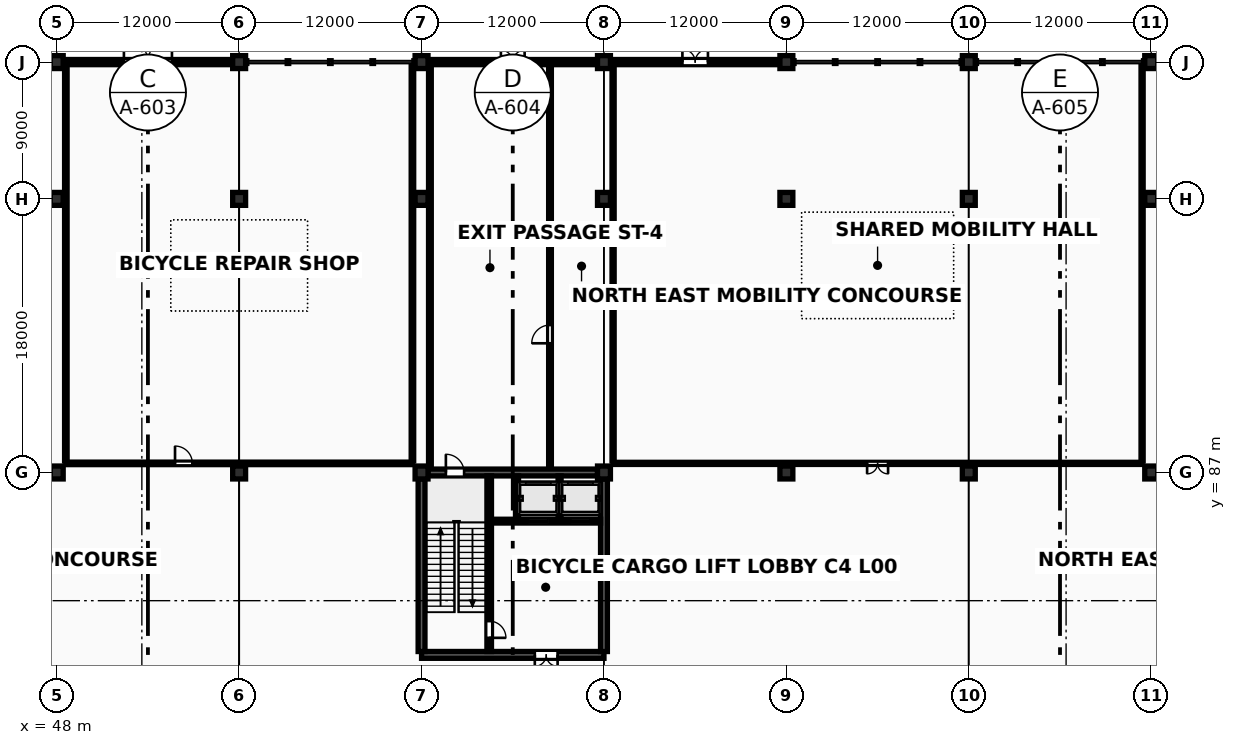
"""IFC4 building model, lengths in metres.
Left out: names, types, materials, properties, quantities, classifications, styles, units other than length and angle.
Written with IfcOpenShell. Run it as: python <this file> out.ifc"""

import sys

from ifc_helpers import new_model, si_unit, direction, frame, frame_2d, origin, origin_2d, place, context, subcontext, project, spatial, rectangle, extrude, element, fill, save


model = new_model("IFC4")
c1 = context("Model", 3, precision=1e-05, world=origin(), true_north=direction((0.0, 1.0)))
c2 = subcontext(c1, "Body", "Model", "MODEL_VIEW")
j1 = project(units=[si_unit("LENGTHUNIT", "METRE"), si_unit("PLANEANGLEUNIT", "RADIAN")], contexts=[c1])
p1 = place(None, origin())
s1 = spatial("IfcSite", under=j1, at=p1, CompositionType="ELEMENT")
p2 = place(p1, origin())
s2 = spatial("IfcBuilding", under=s1, at=p2, CompositionType="ELEMENT")
p3 = place(p2, origin())
s3 = spatial("IfcBuildingStorey", under=s2, at=p3, CompositionType="ELEMENT", Elevation=0.0)
for number, where, z_axis, x_axis in (
    (1, (48.0, 87.0, 0.0), (0.0, 0.0, 1.0), (1.0, 0.0, 0.0)),
    (2, (48.0, 105.0, 0.0), (0.0, 0.0, 1.0), (1.0, 0.0, 0.0)),
    (3, (48.0, 114.0, 0.0), (0.0, 0.0, 1.0), (1.0, 0.0, 0.0)),
    (4, (60.0, 87.0, 0.0), (0.0, 0.0, 1.0), (1.0, 0.0, 0.0)),
    (5, (60.0, 105.0, 0.0), (0.0, 0.0, 1.0), (1.0, 0.0, 0.0)),
    (6, (60.0, 114.0, 0.0), (0.0, 0.0, 1.0), (1.0, 0.0, 0.0)),
    (7, (72.0, 87.0, 0.0), (0.0, 0.0, 1.0), (1.0, 0.0, 0.0)),
    (8, (72.0, 105.0, 0.0), (0.0, 0.0, 1.0), (1.0, 0.0, 0.0)),
    (9, (72.0, 114.0, 0.0), (0.0, 0.0, 1.0), (1.0, 0.0, 0.0)),
    (10, (84.0, 87.0, 0.0), (0.0, 0.0, 1.0), (1.0, 0.0, 0.0)),
    (11, (84.0, 105.0, 0.0), (0.0, 0.0, 1.0), (1.0, 0.0, 0.0)),
    (12, (84.0, 114.0, 0.0), (0.0, 0.0, 1.0), (1.0, 0.0, 0.0)),
    (13, (96.0, 87.0, 0.0), (0.0, 0.0, 1.0), (1.0, 0.0, 0.0)),
    (14, (96.0, 105.0, 0.0), (0.0, 0.0, 1.0), (1.0, 0.0, 0.0)),
    (15, (96.0, 114.0, 0.0), (0.0, 0.0, 1.0), (1.0, 0.0, 0.0)),
    (16, (108.0, 87.0, 0.0), (0.0, 0.0, 1.0), (1.0, 0.0, 0.0)),
    (17, (108.0, 105.0, 0.0), (0.0, 0.0, 1.0), (1.0, 0.0, 0.0)),
    (18, (108.0, 114.0, 0.0), (0.0, 0.0, 1.0), (1.0, 0.0, 0.0)),
    (19, (120.0, 87.0, 0.0), (0.0, 0.0, 1.0), (1.0, 0.0, 0.0)),
    (20, (120.0, 105.0, 0.0), (0.0, 0.0, 1.0), (1.0, 0.0, 0.0)),
    (21, (120.0, 114.0, 0.0), (0.0, 0.0, 1.0), (1.0, 0.0, 0.0)),
):
    element("IfcColumn", number, at=place(p3, frame(where, z_axis=z_axis, x_axis=x_axis)), inside=s3, PredefinedType="COLUMN", context=c2, shape_type="SweptSolid", body=[
        extrude(rectangle(XDim=0.85, YDim=0.85, at=origin_2d()), origin(), (0.0, 0.0, 1.0), 5.4),
    ])
p4 = place(p3, frame((72.0, 75.0, 0.0), z_axis=(0.0, 0.0, 1.0), x_axis=(1.0, 0.0, 0.0)))
e22 = element("IfcWall", 22, at=p4, inside=s3, PredefinedType="SHEAR", context=c2, shape_type="SweptSolid", body=[
    extrude(rectangle(XDim=12.0, YDim=0.45, at=frame_2d((6.0, 0.0))), origin(), (0.0, 0.0, 1.0), 5.203),
])
p5 = place(p4, frame((7.45, 0.0, 0.0)))
e23 = element("IfcOpeningElement", 23, at=p5, cuts=e22, PredefinedType="OPENING", context=c2, shape_type="SweptSolid", body=[
    extrude(rectangle(XDim=1.5, YDim=2.25, at=frame_2d((0.75, 1.125))), frame((0.0, 0.24, 0.0), z_axis=(0.0, -1.0, 0.0), x_axis=(1.0, 0.0, 0.0)), (0.0, 0.0, 1.0), 0.48),
])
p6 = place(p3, frame((72.422, 87.0, 0.0), z_axis=(0.0, 0.0, 1.0), x_axis=(1.0, 0.0, 0.0)))
e24 = element("IfcWall", 24, at=p6, inside=s3, PredefinedType="SHEAR", context=c2, shape_type="SweptSolid", body=[
    extrude(rectangle(XDim=11.156, YDim=0.45, at=frame_2d((5.578, 0.0))), origin(), (0.0, 0.0, 1.0), 5.203),
])
p7 = place(p6, frame((1.178, 0.0, 0.0)))
e25 = element("IfcOpeningElement", 25, at=p7, cuts=e24, PredefinedType="OPENING", context=c2, shape_type="SweptSolid", body=[
    extrude(rectangle(XDim=1.2, YDim=2.2, at=frame_2d((0.6, 1.1))), frame((0.0, 0.24, 0.0), z_axis=(0.0, -1.0, 0.0), x_axis=(1.0, 0.0, 0.0)), (0.0, 0.0, 1.0), 0.48),
])
for number, where, z_axis, x_axis in (
    (26, (72.0, 75.222, 0.0), (0.0, 0.0, 1.0), (0.0, 1.0, 0.0)),
    (27, (84.0, 75.222, 0.0), (0.0, 0.0, 1.0), (0.0, 1.0, 0.0)),
):
    element("IfcWall", number, at=place(p3, frame(where, z_axis=z_axis, x_axis=x_axis)), inside=s3, PredefinedType="SHEAR", context=c2, shape_type="SweptSolid", body=[
        extrude(rectangle(XDim=11.356, YDim=0.45, at=frame_2d((5.678, 0.0))), origin(), (0.0, 0.0, 1.0), 5.203),
    ])
p8 = place(p3, frame((76.45, 75.222, 0.0), z_axis=(0.0, 0.0, 1.0), x_axis=(0.0, 1.0, 0.0)))
e28 = element("IfcWall", 28, at=p8, inside=s3, PredefinedType="SHEAR", context=c2, shape_type="SweptSolid", body=[
    extrude(rectangle(XDim=11.556, YDim=0.3, at=frame_2d((5.778, 0.0))), origin(), (0.0, 0.0, 1.0), 5.203),
])
p9 = place(p8, frame((0.9, 0.0, 0.0)))
e29 = element("IfcOpeningElement", 29, at=p9, cuts=e28, PredefinedType="OPENING", context=c2, shape_type="SweptSolid", body=[
    extrude(rectangle(XDim=1.1, YDim=2.2, at=frame_2d((0.55, 1.1))), frame((0.0, 0.165, 0.0), z_axis=(0.0, -1.0, 0.0), x_axis=(1.0, 0.0, 0.0)), (0.0, 0.0, 1.0), 0.33),
])
p10 = place(p3, frame((76.597, 83.8, 0.0), z_axis=(0.0, 0.0, 1.0), x_axis=(1.0, 0.0, 0.0)))
e30 = element("IfcWall", 30, at=p10, inside=s3, PredefinedType="SOLIDWALL", context=c2, shape_type="SweptSolid", body=[
    extrude(rectangle(XDim=7.181, YDim=0.25, at=frame_2d((3.591, 0.0))), origin(), (0.0, 0.0, 1.0), 5.203),
])
p11 = place(p10, frame((2.433, 0.0, 0.0)))
e31 = element("IfcOpeningElement", 31, at=p11, cuts=e30, PredefinedType="OPENING", context=c2, shape_type="SweptSolid", body=[
    extrude(rectangle(XDim=1.3, YDim=2.28, at=frame_2d((0.65, 1.14))), frame((0.0, 0.14, 0.0), z_axis=(0.0, -1.0, 0.0), x_axis=(1.0, 0.0, 0.0)), (0.0, 0.0, 1.0), 0.28),
])
p12 = place(p10, frame((5.203, 0.0, 0.0)))
e32 = element("IfcOpeningElement", 32, at=p12, cuts=e30, PredefinedType="OPENING", context=c2, shape_type="SweptSolid", body=[
    extrude(rectangle(XDim=1.3, YDim=2.28, at=frame_2d((0.65, 1.14))), frame((0.0, 0.14, 0.0), z_axis=(0.0, -1.0, 0.0), x_axis=(1.0, 0.0, 0.0)), (0.0, 0.0, 1.0), 0.28),
])
for number, where, z_axis, x_axis in (
    (33, (78.28, 83.92, 0.0), (0.0, 0.0, 1.0), (0.0, 1.0, 0.0)),
    (34, (81.08, 83.92, 0.0), (0.0, 0.0, 1.0), (0.0, 1.0, 0.0)),
):
    element("IfcWall", number, at=place(p3, frame(where, z_axis=z_axis, x_axis=x_axis)), inside=s3, PredefinedType="SOLIDWALL", context=c2, shape_type="SweptSolid", body=[
        extrude(rectangle(XDim=2.855, YDim=0.2, at=frame_2d((1.427, 0.0))), origin(), (0.0, 0.0, 1.0), 5.193),
    ])
p13 = place(p3, frame((48.423, 114.0, 0.0), z_axis=(0.0, 0.0, 1.0), x_axis=(1.0, 0.0, 0.0)))
e35 = element("IfcWall", 35, at=p13, inside=s3, PredefinedType="SOLIDWALL", context=c2, shape_type="SweptSolid", body=[
    extrude(rectangle(XDim=11.154, YDim=0.34, at=frame_2d((5.577, 0.0))), origin(), (0.0, 0.0, 1.0), 3.85),
])
p14 = place(p13, frame((3.997, 0.0, 0.0)))
e36 = element("IfcOpeningElement", 36, at=p14, cuts=e35, PredefinedType="OPENING", context=c2, shape_type="SweptSolid", body=[
    extrude(rectangle(XDim=3.16, YDim=2.66, at=frame_2d((1.58, 1.33))), frame((0.0, 0.185, 0.0), z_axis=(0.0, -1.0, 0.0), x_axis=(1.0, 0.0, 0.0)), (0.0, 0.0, 1.0), 0.37),
])
p15 = place(p3, frame((72.423, 114.0, 0.0), z_axis=(0.0, 0.0, 1.0), x_axis=(1.0, 0.0, 0.0)))
e37 = element("IfcWall", 37, at=p15, inside=s3, PredefinedType="SOLIDWALL", context=c2, shape_type="SweptSolid", body=[
    extrude(rectangle(XDim=11.154, YDim=0.34, at=frame_2d((5.577, 0.0))), origin(), (0.0, 0.0, 1.0), 3.85),
])
p16 = place(p15, frame((4.797, 0.0, 0.0)))
e38 = element("IfcOpeningElement", 38, at=p16, cuts=e37, PredefinedType="OPENING", context=c2, shape_type="SweptSolid", body=[
    extrude(rectangle(XDim=1.56, YDim=2.3, at=frame_2d((0.78, 1.15))), frame((0.0, 0.185, 0.0), z_axis=(0.0, -1.0, 0.0), x_axis=(1.0, 0.0, 0.0)), (0.0, 0.0, 1.0), 0.37),
])
p17 = place(p3, frame((84.423, 114.0, 0.0), z_axis=(0.0, 0.0, 1.0), x_axis=(1.0, 0.0, 0.0)))
e39 = element("IfcWall", 39, at=p17, inside=s3, PredefinedType="SOLIDWALL", context=c2, shape_type="SweptSolid", body=[
    extrude(rectangle(XDim=11.154, YDim=0.34, at=frame_2d((5.577, 0.0))), origin(), (0.0, 0.0, 1.0), 3.85),
])
p18 = place(p17, frame((4.737, 0.0, 0.0)))
e40 = element("IfcOpeningElement", 40, at=p18, cuts=e39, PredefinedType="OPENING", context=c2, shape_type="SweptSolid", body=[
    extrude(rectangle(XDim=1.68, YDim=2.34, at=frame_2d((0.84, 1.17))), frame((0.0, 0.185, 0.0), z_axis=(0.0, -1.0, 0.0), x_axis=(1.0, 0.0, 0.0)), (0.0, 0.0, 1.0), 0.37),
])
p19 = place(p3, frame((72.55, 87.3, 0.0), z_axis=(0.0, 0.0, 1.0), x_axis=(0.0, 1.0, 0.0)))
e41 = element("IfcWall", 41, at=p19, inside=s3, PredefinedType="SOLIDWALL", context=c2, shape_type="SweptSolid", body=[
    extrude(rectangle(XDim=26.3, YDim=0.18, at=frame_2d((13.15, 0.0))), origin(), (0.0, 0.0, 1.0), 2.6),
])
p20 = place(p3, frame((80.45, 87.3, 0.0), z_axis=(0.0, 0.0, 1.0), x_axis=(0.0, 1.0, 0.0)))
e42 = element("IfcWall", 42, at=p20, inside=s3, PredefinedType="SOLIDWALL", context=c2, shape_type="SweptSolid", body=[
    extrude(rectangle(XDim=26.3, YDim=0.18, at=frame_2d((13.15, 0.0))), origin(), (0.0, 0.0, 1.0), 2.6),
])
p21 = place(p20, frame((8.2, 0.0, 0.0)))
e43 = element("IfcOpeningElement", 43, at=p21, cuts=e42, PredefinedType="OPENING", context=c2, shape_type="SweptSolid", body=[
    extrude(rectangle(XDim=1.2, YDim=2.2, at=frame_2d((0.6, 1.1))), frame((0.0, 0.105, 0.0), z_axis=(0.0, -1.0, 0.0), x_axis=(1.0, 0.0, 0.0)), (0.0, 0.0, 1.0), 0.21),
])
p22 = place(p3, frame((48.6, 87.6, 0.0), z_axis=(0.0, 0.0, 1.0), x_axis=(1.0, 0.0, 0.0)))
e44 = element("IfcWall", 44, at=p22, inside=s3, PredefinedType="PARTITIONING", context=c2, shape_type="SweptSolid", body=[
    extrude(rectangle(XDim=22.8, YDim=0.165, at=frame_2d((11.4, 0.0))), origin(), (0.0, 0.0, 1.0), 2.75),
])
p23 = place(p22, frame((7.182, 0.0, 0.0)))
e45 = element("IfcOpeningElement", 45, at=p23, cuts=e44, PredefinedType="OPENING", context=c2, shape_type="SweptSolid", body=[
    extrude(rectangle(XDim=1.14, YDim=2.24, at=frame_2d((0.57, 1.12))), frame((0.0, 0.097, 0.0), z_axis=(0.0, -1.0, 0.0), x_axis=(1.0, 0.0, 0.0)), (0.0, 0.0, 1.0), 0.195),
])
for number, where, z_axis, x_axis in (
    (46, (48.6, 87.76, 0.0), (0.0, 0.0, 1.0), (0.0, 1.0, 0.0)),
    (47, (71.4, 87.76, 0.0), (0.0, 0.0, 1.0), (0.0, 1.0, 0.0)),
):
    element("IfcWall", number, at=place(p3, frame(where, z_axis=z_axis, x_axis=x_axis)), inside=s3, PredefinedType="PARTITIONING", context=c2, shape_type="SweptSolid", body=[
        extrude(rectangle(XDim=26.1, YDim=0.165, at=frame_2d((13.05, 0.0))), origin(), (0.0, 0.0, 1.0), 2.75),
    ])
p24 = place(p3, frame((84.6, 87.6, 0.0), z_axis=(0.0, 0.0, 1.0), x_axis=(1.0, 0.0, 0.0)))
e48 = element("IfcWall", 48, at=p24, inside=s3, PredefinedType="PARTITIONING", context=c2, shape_type="SweptSolid", body=[
    extrude(rectangle(XDim=34.8, YDim=0.14, at=frame_2d((17.4, 0.0))), origin(), (0.0, 0.0, 1.0), 2.75),
])
p25 = place(p24, frame((16.71, 0.0, 0.0)))
e49 = element("IfcOpeningElement", 49, at=p25, cuts=e48, PredefinedType="OPENING", context=c2, shape_type="SweptSolid", body=[
    extrude(rectangle(XDim=1.38, YDim=2.23, at=frame_2d((0.69, 1.115))), frame((0.0, 0.085, 0.0), z_axis=(0.0, -1.0, 0.0), x_axis=(1.0, 0.0, 0.0)), (0.0, 0.0, 1.0), 0.17),
])
for number, where, z_axis, x_axis in (
    (50, (84.6, 87.76, 0.0), (0.0, 0.0, 1.0), (0.0, 1.0, 0.0)),
    (51, (119.4, 87.76, 0.0), (0.0, 0.0, 1.0), (0.0, 1.0, 0.0)),
):
    element("IfcWall", number, at=place(p3, frame(where, z_axis=z_axis, x_axis=x_axis)), inside=s3, PredefinedType="PARTITIONING", context=c2, shape_type="SweptSolid", body=[
        extrude(rectangle(XDim=26.1, YDim=0.14, at=frame_2d((13.05, 0.0))), origin(), (0.0, 0.0, 1.0), 2.75),
    ])
p26 = place(p14, origin())
e52 = element("IfcDoor", 52, at=p26, inside=s3, OperationType="DOUBLE_DOOR_SINGLE_SWING", PredefinedType="GATE", context=c2, shape_type="SweptSolid", body=[
    extrude(rectangle(XDim=3.16, YDim=2.66, at=frame_2d((1.58, 1.33))), frame((0.0, 0.025, 0.0), z_axis=(0.0, -1.0, 0.0), x_axis=(1.0, 0.0, 0.0)), (0.0, 0.0, 1.0), 0.05),
])
fill(e36, e52)
p27 = place(p16, origin())
e53 = element("IfcDoor", 53, at=p27, inside=s3, OperationType="DOUBLE_DOOR_SINGLE_SWING", PredefinedType="DOOR", context=c2, shape_type="SweptSolid", body=[
    extrude(rectangle(XDim=1.56, YDim=2.3, at=frame_2d((0.78, 1.15))), frame((0.0, 0.025, 0.0), z_axis=(0.0, -1.0, 0.0), x_axis=(1.0, 0.0, 0.0)), (0.0, 0.0, 1.0), 0.05),
])
fill(e38, e53)
p28 = place(p18, origin())
e54 = element("IfcDoor", 54, at=p28, inside=s3, OperationType="DOUBLE_DOOR_SINGLE_SWING", PredefinedType="DOOR", context=c2, shape_type="SweptSolid", body=[
    extrude(rectangle(XDim=1.68, YDim=2.34, at=frame_2d((0.84, 1.17))), frame((0.0, 0.025, 0.0), z_axis=(0.0, -1.0, 0.0), x_axis=(1.0, 0.0, 0.0)), (0.0, 0.0, 1.0), 0.05),
])
fill(e40, e54)
p29 = place(p9, origin())
e55 = element("IfcDoor", 55, at=p29, inside=s3, OperationType="SINGLE_SWING_LEFT", PredefinedType="DOOR", context=c2, shape_type="SweptSolid", body=[
    extrude(rectangle(XDim=1.1, YDim=2.2, at=frame_2d((0.55, 1.1))), frame((0.0, 0.025, 0.0), z_axis=(0.0, -1.0, 0.0), x_axis=(1.0, 0.0, 0.0)), (0.0, 0.0, 1.0), 0.05),
])
fill(e29, e55)
p30 = place(p5, origin())
e56 = element("IfcDoor", 56, at=p30, inside=s3, OperationType="DOUBLE_DOOR_SINGLE_SWING", PredefinedType="DOOR", context=c2, shape_type="SweptSolid", body=[
    extrude(rectangle(XDim=1.5, YDim=2.25, at=frame_2d((0.75, 1.125))), frame((0.0, 0.025, 0.0), z_axis=(0.0, -1.0, 0.0), x_axis=(1.0, 0.0, 0.0)), (0.0, 0.0, 1.0), 0.05),
])
fill(e23, e56)
p31 = place(p7, origin())
e57 = element("IfcDoor", 57, at=p31, inside=s3, OperationType="SINGLE_SWING_LEFT", PredefinedType="DOOR", context=c2, shape_type="SweptSolid", body=[
    extrude(rectangle(XDim=1.2, YDim=2.2, at=frame_2d((0.6, 1.1))), frame((0.0, 0.025, 0.0), z_axis=(0.0, -1.0, 0.0), x_axis=(1.0, 0.0, 0.0)), (0.0, 0.0, 1.0), 0.05),
])
fill(e25, e57)
p32 = place(p11, origin())
e58 = element("IfcDoor", 58, at=p32, inside=s3, OperationType="SLIDING_TO_LEFT", PredefinedType="USERDEFINED", context=c2, shape_type="SweptSolid", body=[
    extrude(rectangle(XDim=1.3, YDim=2.28, at=frame_2d((0.65, 1.14))), frame((0.0, 0.025, 0.0), z_axis=(0.0, -1.0, 0.0), x_axis=(1.0, 0.0, 0.0)), (0.0, 0.0, 1.0), 0.05),
])
fill(e31, e58)
p33 = place(p12, origin())
e59 = element("IfcDoor", 59, at=p33, inside=s3, OperationType="SLIDING_TO_LEFT", PredefinedType="USERDEFINED", context=c2, shape_type="SweptSolid", body=[
    extrude(rectangle(XDim=1.3, YDim=2.28, at=frame_2d((0.65, 1.14))), frame((0.0, 0.025, 0.0), z_axis=(0.0, -1.0, 0.0), x_axis=(1.0, 0.0, 0.0)), (0.0, 0.0, 1.0), 0.05),
])
fill(e32, e59)
p34 = place(p21, frame((1.2, 0.0, 0.0), z_axis=(0.0, 0.0, 1.0), x_axis=(-1.0, 0.0, 0.0)))
e60 = element("IfcDoor", 60, at=p34, inside=s3, OperationType="SINGLE_SWING_LEFT", PredefinedType="DOOR", context=c2, shape_type="SweptSolid", body=[
    extrude(rectangle(XDim=1.2, YDim=2.2, at=frame_2d((0.6, 1.1))), frame((0.0, 0.025, 0.0), z_axis=(0.0, -1.0, 0.0), x_axis=(1.0, 0.0, 0.0)), (0.0, 0.0, 1.0), 0.05),
])
fill(e43, e60)
p35 = place(p23, origin())
e61 = element("IfcDoor", 61, at=p35, inside=s3, OperationType="SINGLE_SWING_LEFT", PredefinedType="DOOR", context=c2, shape_type="SweptSolid", body=[
    extrude(rectangle(XDim=1.14, YDim=2.24, at=frame_2d((0.57, 1.12))), frame((0.0, 0.025, 0.0), z_axis=(0.0, -1.0, 0.0), x_axis=(1.0, 0.0, 0.0)), (0.0, 0.0, 1.0), 0.05),
])
fill(e45, e61)
p36 = place(p25, origin())
e62 = element("IfcDoor", 62, at=p36, inside=s3, OperationType="DOUBLE_DOOR_SINGLE_SWING", PredefinedType="DOOR", context=c2, shape_type="SweptSolid", body=[
    extrude(rectangle(XDim=1.38, YDim=2.23, at=frame_2d((0.69, 1.115))), frame((0.0, 0.025, 0.0), z_axis=(0.0, -1.0, 0.0), x_axis=(1.0, 0.0, 0.0)), (0.0, 0.0, 1.0), 0.05),
])
fill(e49, e62)
save(model, sys.argv[1])
